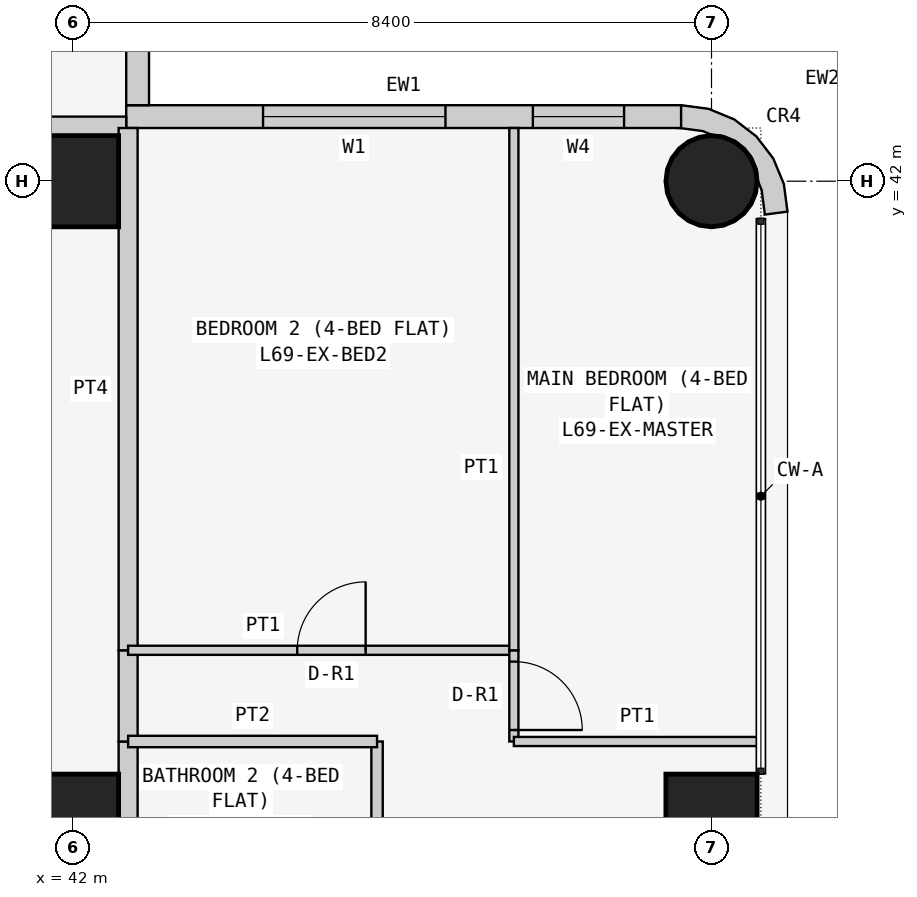
"""IFC4 building model, lengths in metres.
Left out: names, types, materials, properties, quantities, classifications, styles, units other than length and angle.
Written with IfcOpenShell. Run it as: python <this file> out.ifc"""

import sys

from ifc_helpers import new_model, si_unit, direction, frame, frame_2d, origin, origin_2d, place, context, subcontext, project, spatial, polyline, rectangle, circle, outline, extrude, element, fill, save


model = new_model("IFC4")
c1 = context("Model", 3, precision=1e-05, world=origin(), true_north=direction((0.0, 1.0)))
c2 = subcontext(c1, "Body", "Model", "MODEL_VIEW")
j1 = project(units=[si_unit("LENGTHUNIT", "METRE"), si_unit("PLANEANGLEUNIT", "RADIAN")], contexts=[c1])
p1 = place(None, origin())
s1 = spatial("IfcSite", under=j1, at=p1, CompositionType="ELEMENT")
p2 = place(p1, origin())
s2 = spatial("IfcBuilding", under=s1, at=p2, CompositionType="ELEMENT")
p3 = place(p2, frame((0.0, 0.0, 264.9)))
s3 = spatial("IfcBuildingStorey", under=s2, at=p3, CompositionType="ELEMENT", Elevation=264.9)
for number, where, z_axis, x_axis in (
    (1, (42.0, 33.6, 0.0), (0.0, 0.0, 1.0), (1.0, 0.0, 0.0)),
    (2, (42.0, 42.0, 0.0), (0.0, 0.0, 1.0), (1.0, 0.0, 0.0)),
    (3, (50.4, 33.6, 0.0), (0.0, 0.0, 1.0), (1.0, 0.0, 0.0)),
):
    element("IfcColumn", number, at=place(p3, frame(where, z_axis=z_axis, x_axis=x_axis)), inside=s3, PredefinedType="COLUMN", context=c2, shape_type="SweptSolid", body=[
        extrude(rectangle(XDim=1.2, YDim=1.2, at=origin_2d()), origin(), (0.0, 0.0, 1.0), 3.6),
    ])
p4 = place(p3, frame((50.4, 42.0, 0.0), z_axis=(0.0, 0.0, 1.0), x_axis=(1.0, 0.0, 0.0)))
e4 = element("IfcColumn", 4, at=p4, inside=s3, PredefinedType="COLUMN", context=c2, shape_type="SweptSolid", body=[
    extrude(circle(Radius=0.6, at=origin_2d()), origin(), (0.0, 0.0, 1.0), 3.6),
])
p5 = place(p3, frame((50.0, 42.85, 0.0), z_axis=(0.0, 0.0, 1.0), x_axis=(-1.0, 0.0, 0.0)))
e5 = element("IfcWall", 5, at=p5, inside=s3, PredefinedType="SOLIDWALL", context=c2, shape_type="SweptSolid", body=[
    extrude(rectangle(XDim=7.3, YDim=0.3, at=frame_2d((3.65, 0.0))), origin(), (0.0, 0.0, 1.0), 3.45),
])
p6 = place(p5, frame((3.1, 0.0, 0.9)))
e6 = element("IfcOpeningElement", 6, at=p6, cuts=e5, PredefinedType="OPENING", context=c2, shape_type="SweptSolid", body=[
    extrude(rectangle(XDim=2.4, YDim=1.5, at=frame_2d((1.2, 0.75))), frame((0.0, 0.16, 0.0), z_axis=(0.0, -1.0, 0.0), x_axis=(1.0, 0.0, 0.0)), (0.0, 0.0, 1.0), 0.32),
])
p7 = place(p5, frame((0.75, 0.0, 0.9)))
e7 = element("IfcOpeningElement", 7, at=p7, cuts=e5, PredefinedType="OPENING", context=c2, shape_type="SweptSolid", body=[
    extrude(rectangle(XDim=1.2, YDim=1.5, at=frame_2d((0.6, 0.75))), frame((0.0, 0.16, 0.0), z_axis=(0.0, -1.0, 0.0), x_axis=(1.0, 0.0, 0.0)), (0.0, 0.0, 1.0), 0.32),
])
p8 = place(p3, frame((42.85, 43.0, 0.0), z_axis=(0.0, 0.0, 1.0), x_axis=(0.0, 1.0, 0.0)))
e8 = element("IfcWall", 8, at=p8, inside=s3, PredefinedType="SOLIDWALL", context=c2, shape_type="SweptSolid", body=[
    extrude(rectangle(XDim=7.0, YDim=0.3, at=frame_2d((3.5, 0.0))), origin(), (0.0, 0.0, 1.0), 3.45),
])
p9 = place(p8, frame((1.5, 0.0, 0.9)))
e9 = element("IfcOpeningElement", 9, at=p9, cuts=e8, PredefinedType="OPENING", context=c2, shape_type="SweptSolid", body=[
    extrude(rectangle(XDim=2.4, YDim=1.5, at=frame_2d((1.2, 0.75))), frame((0.0, 0.16, 0.0), z_axis=(0.0, -1.0, 0.0), x_axis=(1.0, 0.0, 0.0)), (0.0, 0.0, 1.0), 0.32),
])
p10 = place(p8, frame((5.05, 0.0, 0.9)))
e10 = element("IfcOpeningElement", 10, at=p10, cuts=e8, PredefinedType="OPENING", context=c2, shape_type="SweptSolid", body=[
    extrude(rectangle(XDim=1.2, YDim=1.5, at=frame_2d((0.6, 0.75))), frame((0.0, 0.16, 0.0), z_axis=(0.0, -1.0, 0.0), x_axis=(1.0, 0.0, 0.0)), (0.0, 0.0, 1.0), 0.32),
])
p11 = place(p3, frame((50.976, 41.638, 0.0), z_axis=(0.0, 0.0, 1.0), x_axis=(0.707106781187, 0.707106781187, 0.0)))
e11 = element("IfcWall", 11, at=p11, inside=s3, PredefinedType="SOLIDWALL", context=c2, shape_type="SweptSolid", body=[
    extrude(outline(polyline([(0.233, 0.114), (0.047, -0.129), (0.033, -0.143), (0.273, -0.327), (0.495, -0.037), (0.635, 0.301), (0.683, 0.663), (0.635, 1.025), (0.495, 1.363), (0.273, 1.653), (0.033, 1.469), (0.047, 1.455), (0.233, 1.212), (0.292, 1.069), (0.358, 1.003), (0.449, 0.782), (0.449, 0.543), (0.358, 0.322), (0.292, 0.257), (0.233, 0.114)])), origin(), (0.0, 0.0, 1.0), 3.45),
])
p12 = place(p3, frame((35.829, 42.725, 0.0), z_axis=(0.0, 0.0, 1.0), x_axis=(1.0, 0.0, 0.0)))
e12 = element("IfcWall", 12, at=p12, inside=s3, PredefinedType="PARTITIONING", context=c2, shape_type="SweptSolid", body=[
    extrude(rectangle(XDim=6.871, YDim=0.25, at=frame_2d((3.436, 0.0))), origin(), (0.0, 0.0, 1.0), 3.45),
])
p13 = place(p3, frame((42.725, 34.629, 0.0), z_axis=(0.0, 0.0, 1.0), x_axis=(0.0, -1.0, 0.0)))
e13 = element("IfcWall", 13, at=p13, inside=s3, PredefinedType="PARTITIONING", context=c2, shape_type="SweptSolid", body=[
    extrude(rectangle(XDim=2.629, YDim=0.25, at=frame_2d((1.314, 0.0))), origin(), (0.0, 0.0, 1.0), 3.45),
])
p14 = place(p3, frame((42.725, 35.829, 0.0), z_axis=(0.0, 0.0, 1.0), x_axis=(0.0, -1.0, 0.0)))
e14 = element("IfcWall", 14, at=p14, inside=s3, PredefinedType="PARTITIONING", context=c2, shape_type="SweptSolid", body=[
    extrude(rectangle(XDim=1.2, YDim=0.25, at=frame_2d((0.6, 0.0))), origin(), (0.0, 0.0, 1.0), 3.45),
])
p15 = place(p3, frame((42.725, 42.7, 0.0), z_axis=(0.0, 0.0, 1.0), x_axis=(0.0, -1.0, 0.0)))
e15 = element("IfcWall", 15, at=p15, inside=s3, PredefinedType="PARTITIONING", context=c2, shape_type="SweptSolid", body=[
    extrude(rectangle(XDim=6.871, YDim=0.25, at=frame_2d((3.436, 0.0))), origin(), (0.0, 0.0, 1.0), 3.45),
])
p16 = place(p3, frame((46.0, 32.0, 0.0), z_axis=(0.0, 0.0, 1.0), x_axis=(0.0, 1.0, 0.0)))
e16 = element("IfcWall", 16, at=p16, inside=s3, PredefinedType="PARTITIONING", context=c2, shape_type="SweptSolid", body=[
    extrude(rectangle(XDim=2.629, YDim=0.15, at=frame_2d((1.314, 0.0))), origin(), (0.0, 0.0, 1.0), 3.45),
])
p17 = place(p3, frame((46.0, 34.629, 0.0), z_axis=(0.0, 0.0, 1.0), x_axis=(-1.0, 0.0, 0.0)))
e17 = element("IfcWall", 17, at=p17, inside=s3, PredefinedType="PARTITIONING", context=c2, shape_type="SweptSolid", body=[
    extrude(rectangle(XDim=3.275, YDim=0.15, at=frame_2d((1.637, 0.0))), origin(), (0.0, 0.0, 1.0), 3.45),
])
p18 = place(p3, frame((42.725, 35.829, 0.0), z_axis=(0.0, 0.0, 1.0), x_axis=(1.0, 0.0, 0.0)))
e18 = element("IfcWall", 18, at=p18, inside=s3, PredefinedType="PARTITIONING", context=c2, shape_type="SweptSolid", body=[
    extrude(rectangle(XDim=5.075, YDim=0.12, at=frame_2d((2.538, 0.0))), origin(), (0.0, 0.0, 1.0), 3.45),
])
p19 = place(p18, frame((2.225, 0.0, 0.0)))
e19 = element("IfcOpeningElement", 19, at=p19, cuts=e18, PredefinedType="OPENING", context=c2, shape_type="SweptSolid", body=[
    extrude(rectangle(XDim=0.9, YDim=2.1, at=frame_2d((0.45, 1.05))), frame((0.0, 0.07, 0.0), z_axis=(0.0, -1.0, 0.0), x_axis=(1.0, 0.0, 0.0)), (0.0, 0.0, 1.0), 0.14),
])
p20 = place(p3, frame((47.8, 35.829, 0.0), z_axis=(0.0, 0.0, 1.0), x_axis=(0.0, -1.0, 0.0)))
e20 = element("IfcWall", 20, at=p20, inside=s3, PredefinedType="PARTITIONING", context=c2, shape_type="SweptSolid", body=[
    extrude(rectangle(XDim=1.2, YDim=0.12, at=frame_2d((0.6, 0.0))), origin(), (0.0, 0.0, 1.0), 3.45),
])
p21 = place(p20, frame((0.149, 0.0, 0.0)))
e21 = element("IfcOpeningElement", 21, at=p21, cuts=e20, PredefinedType="OPENING", context=c2, shape_type="SweptSolid", body=[
    extrude(rectangle(XDim=0.9, YDim=2.1, at=frame_2d((0.45, 1.05))), frame((0.0, 0.07, 0.0), z_axis=(0.0, -1.0, 0.0), x_axis=(1.0, 0.0, 0.0)), (0.0, 0.0, 1.0), 0.14),
])
p22 = place(p3, frame((47.8, 34.629, 0.0), z_axis=(0.0, 0.0, 1.0), x_axis=(1.0, 0.0, 0.0)))
e22 = element("IfcWall", 22, at=p22, inside=s3, PredefinedType="PARTITIONING", context=c2, shape_type="SweptSolid", body=[
    extrude(rectangle(XDim=3.25, YDim=0.12, at=frame_2d((1.625, 0.0))), origin(), (0.0, 0.0, 1.0), 3.45),
])
p23 = place(p3, frame((47.8, 35.829, 0.0), z_axis=(0.0, 0.0, 1.0), x_axis=(0.0, 1.0, 0.0)))
e23 = element("IfcWall", 23, at=p23, inside=s3, PredefinedType="PARTITIONING", context=c2, shape_type="SweptSolid", body=[
    extrude(rectangle(XDim=6.871, YDim=0.12, at=frame_2d((3.436, 0.0))), origin(), (0.0, 0.0, 1.0), 3.45),
])
p24 = place(p6, origin())
e24 = element("IfcWindow", 24, at=p24, inside=s3, PartitioningType="SINGLE_PANEL", PredefinedType="WINDOW", context=c2, shape_type="SweptSolid", body=[
    extrude(rectangle(XDim=2.4, YDim=1.5, at=frame_2d((1.2, 0.75))), frame((0.0, 0.03, 0.0), z_axis=(0.0, -1.0, 0.0), x_axis=(1.0, 0.0, 0.0)), (0.0, 0.0, 1.0), 0.06),
])
fill(e6, e24)
p25 = place(p7, origin())
e25 = element("IfcWindow", 25, at=p25, inside=s3, PartitioningType="SINGLE_PANEL", PredefinedType="WINDOW", context=c2, shape_type="SweptSolid", body=[
    extrude(rectangle(XDim=1.2, YDim=1.5, at=frame_2d((0.6, 0.75))), frame((0.0, 0.03, 0.0), z_axis=(0.0, -1.0, 0.0), x_axis=(1.0, 0.0, 0.0)), (0.0, 0.0, 1.0), 0.06),
])
fill(e7, e25)
p26 = place(p19, origin())
e26 = element("IfcDoor", 26, at=p26, inside=s3, OperationType="SINGLE_SWING_RIGHT", PredefinedType="DOOR", context=c2, shape_type="SweptSolid", body=[
    extrude(rectangle(XDim=0.9, YDim=2.1, at=frame_2d((0.45, 1.05))), frame((0.0, 0.025, 0.0), z_axis=(0.0, -1.0, 0.0), x_axis=(1.0, 0.0, 0.0)), (0.0, 0.0, 1.0), 0.05),
])
fill(e19, e26)
p27 = place(p21, origin())
e27 = element("IfcDoor", 27, at=p27, inside=s3, OperationType="SINGLE_SWING_RIGHT", PredefinedType="DOOR", context=c2, shape_type="SweptSolid", body=[
    extrude(rectangle(XDim=0.9, YDim=2.1, at=frame_2d((0.45, 1.05))), frame((0.0, 0.025, 0.0), z_axis=(0.0, -1.0, 0.0), x_axis=(1.0, 0.0, 0.0)), (0.0, 0.0, 1.0), 0.05),
])
fill(e21, e27)
save(model, sys.argv[1])
